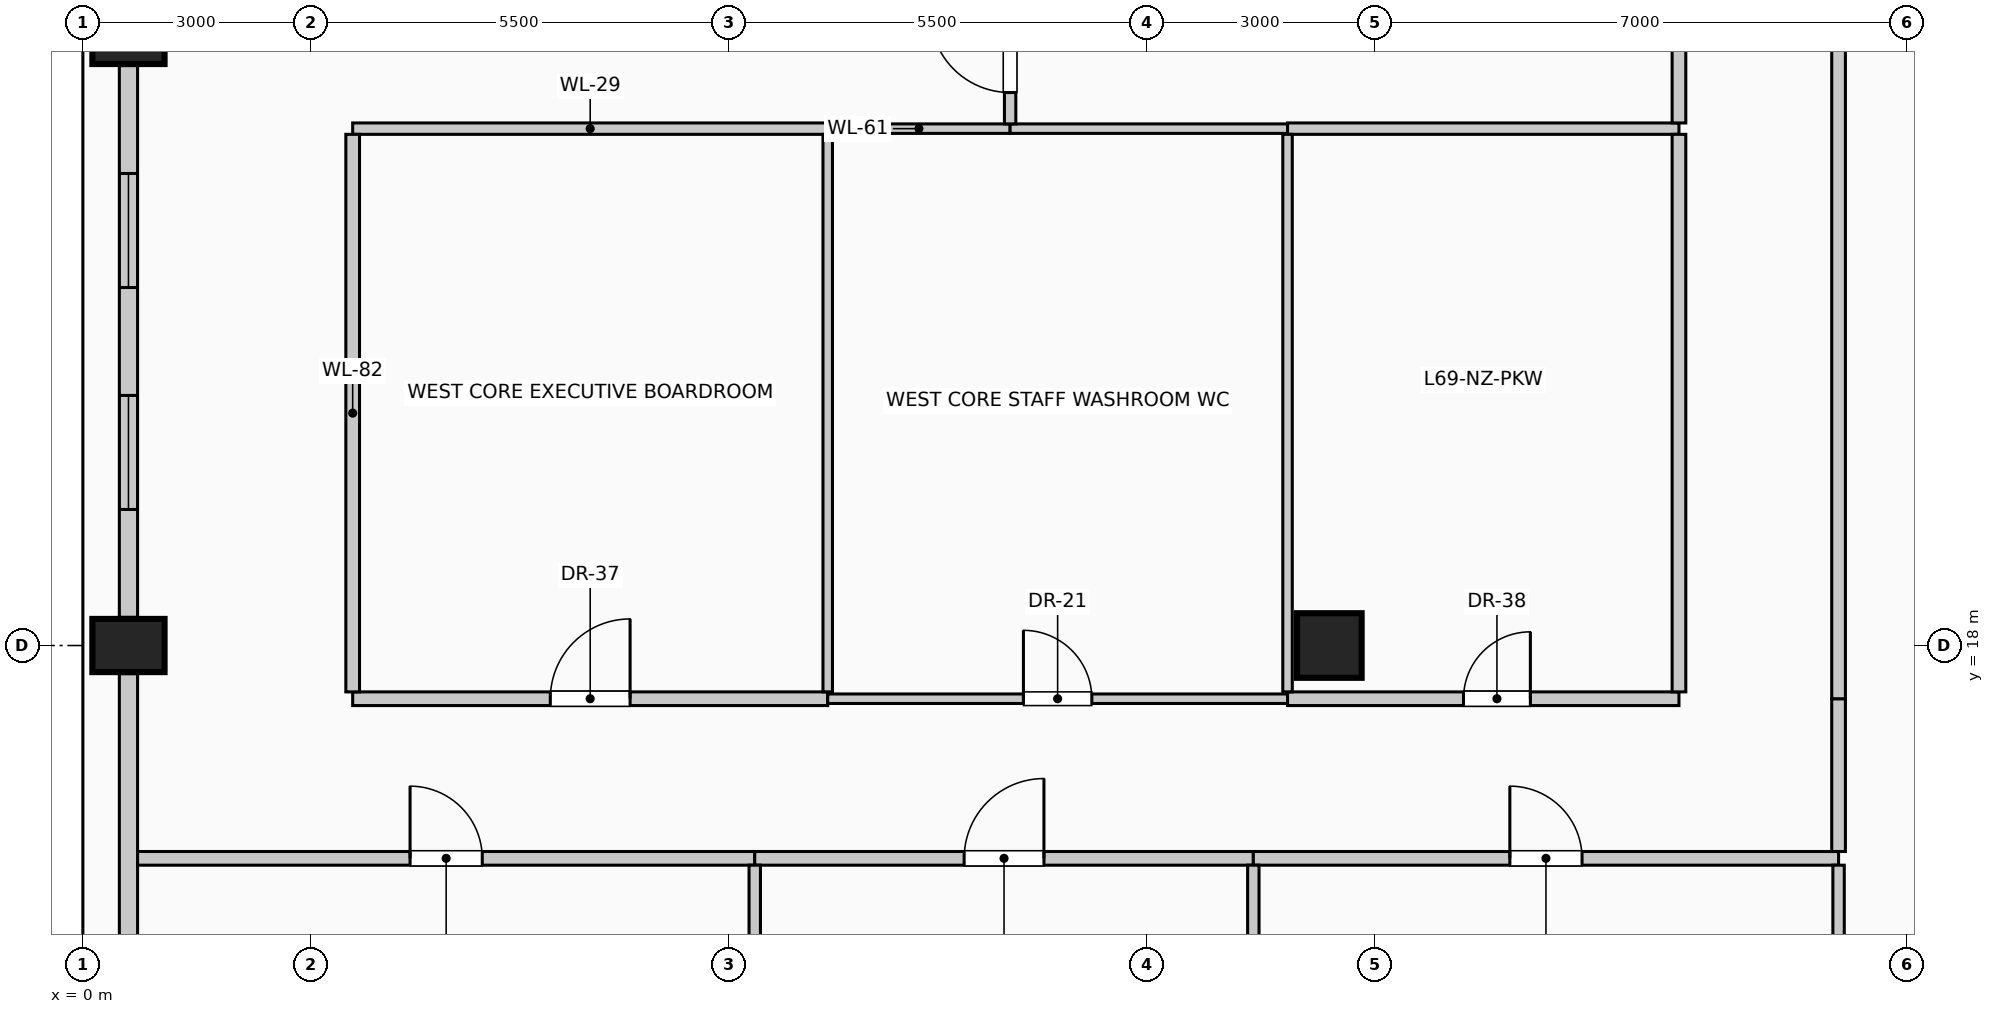
"""IFC4 building model, lengths in metres.
Left out: names, types, materials, properties, quantities, classifications, styles, units other than length and angle.
Written with IfcOpenShell. Run it as: python <this file> out.ifc"""

import sys

from ifc_helpers import new_model, si_unit, direction, frame, frame_2d, origin, origin_2d, place, context, subcontext, project, spatial, rectangle, circle, extrude, element, fill, save


model = new_model("IFC4")
c1 = context("Model", 3, precision=1e-05, world=origin(), true_north=direction((0.0, 1.0)))
c2 = subcontext(c1, "Body", "Model", "MODEL_VIEW")
j1 = project(units=[si_unit("LENGTHUNIT", "METRE"), si_unit("PLANEANGLEUNIT", "RADIAN")], contexts=[c1])
p1 = place(None, origin())
s1 = spatial("IfcSite", under=j1, at=p1, CompositionType="ELEMENT")
p2 = place(p1, origin())
s2 = spatial("IfcBuilding", under=s1, at=p2, CompositionType="ELEMENT")
p3 = place(p2, frame((0.0, 0.0, 285.0)))
s3 = spatial("IfcBuildingStorey", under=s2, at=p3, CompositionType="ELEMENT", Elevation=285.0)
for number, where, z_axis, x_axis in (
    (1, (0.6, 18.0, 0.0), (0.0, 0.0, 1.0), (0.0, 1.0, 0.0)),
    (2, (0.6, 26.0, 0.0), (0.0, 0.0, 1.0), (0.0, 1.0, 0.0)),
):
    element("IfcColumn", number, at=place(p3, frame(where, z_axis=z_axis, x_axis=x_axis)), inside=s3, PredefinedType="COLUMN", context=c2, shape_type="SweptSolid", body=[
        extrude(rectangle(XDim=0.7, YDim=0.95, at=origin_2d()), origin(), (0.0, 0.0, 1.0), 4.0),
    ])
p4 = place(p3, frame((16.4, 18.0, 0.0), z_axis=(0.0, 0.0, 1.0), x_axis=(1.0, 0.0, 0.0)))
e3 = element("IfcColumn", 3, at=p4, inside=s3, PredefinedType="COLUMN", context=c2, shape_type="SweptSolid", body=[
    extrude(circle(Radius=0.425, at=origin_2d()), origin(), (0.0, 0.0, 1.0), 4.0),
])
p5 = place(p3, frame((0.6, 10.37, 0.0), z_axis=(0.0, 0.0, 1.0), x_axis=(0.0, 1.0, 0.0)))
e4 = element("IfcWall", 4, at=p5, inside=s3, PredefinedType="SOLIDWALL", context=c2, shape_type="SweptSolid", body=[
    extrude(rectangle(XDim=7.26, YDim=0.24, at=frame_2d((3.63, 0.0))), origin(), (0.0, 0.0, 1.0), 3.025),
])
p6 = place(p5, frame((1.42, 0.0, 0.42)))
e5 = element("IfcOpeningElement", 5, at=p6, cuts=e4, PredefinedType="OPENING", context=c2, shape_type="SweptSolid", body=[
    extrude(rectangle(XDim=1.5, YDim=2.2, at=frame_2d((0.75, 1.1))), frame((0.0, 0.13, 0.0), z_axis=(0.0, -1.0, 0.0), x_axis=(1.0, 0.0, 0.0)), (0.0, 0.0, 1.0), 0.26),
])
p7 = place(p3, frame((0.6, 18.37, 0.0), z_axis=(0.0, 0.0, 1.0), x_axis=(0.0, 1.0, 0.0)))
e6 = element("IfcWall", 6, at=p7, inside=s3, PredefinedType="SOLIDWALL", context=c2, shape_type="SweptSolid", body=[
    extrude(rectangle(XDim=7.26, YDim=0.24, at=frame_2d((3.63, 0.0))), origin(), (0.0, 0.0, 1.0), 3.025),
])
p8 = place(p7, frame((1.42, 0.0, 0.42)))
e7 = element("IfcOpeningElement", 7, at=p8, cuts=e6, PredefinedType="OPENING", context=c2, shape_type="SweptSolid", body=[
    extrude(rectangle(XDim=1.5, YDim=2.2, at=frame_2d((0.75, 1.1))), frame((0.0, 0.13, 0.0), z_axis=(0.0, -1.0, 0.0), x_axis=(1.0, 0.0, 0.0)), (0.0, 0.0, 1.0), 0.26),
])
p9 = place(p7, frame((4.34, 0.0, 0.42)))
e8 = element("IfcOpeningElement", 8, at=p9, cuts=e6, PredefinedType="OPENING", context=c2, shape_type="SweptSolid", body=[
    extrude(rectangle(XDim=1.5, YDim=2.2, at=frame_2d((0.75, 1.1))), frame((0.0, 0.13, 0.0), z_axis=(0.0, -1.0, 0.0), x_axis=(1.0, 0.0, 0.0)), (0.0, 0.0, 1.0), 0.26),
])
p10 = place(p3, frame((0.72, 15.2, 0.0), z_axis=(0.0, 0.0, 1.0), x_axis=(1.0, 0.0, 0.0)))
e9 = element("IfcWall", 9, at=p10, inside=s3, PredefinedType="PARTITIONING", context=c2, shape_type="SweptSolid", body=[
    extrude(rectangle(XDim=8.12, YDim=0.18, at=frame_2d((4.06, 0.0))), origin(), (0.0, 0.0, 1.0), 3.775),
])
p11 = place(p10, frame((3.585, 0.0, 0.0)))
e10 = element("IfcOpeningElement", 10, at=p11, cuts=e9, PredefinedType="OPENING", context=c2, shape_type="SweptSolid", body=[
    extrude(rectangle(XDim=0.95, YDim=2.15, at=frame_2d((0.475, 1.075))), frame((0.0, 0.1, 0.0), z_axis=(0.0, -1.0, 0.0), x_axis=(1.0, 0.0, 0.0)), (0.0, 0.0, 1.0), 0.2),
])
p12 = place(p3, frame((8.84, 15.2, 0.0), z_axis=(0.0, 0.0, 1.0), x_axis=(1.0, 0.0, 0.0)))
e11 = element("IfcWall", 11, at=p12, inside=s3, PredefinedType="PARTITIONING", context=c2, shape_type="SweptSolid", body=[
    extrude(rectangle(XDim=6.56, YDim=0.18, at=frame_2d((3.28, 0.0))), origin(), (0.0, 0.0, 1.0), 3.775),
])
p13 = place(p12, frame((2.755, 0.0, 0.0)))
e12 = element("IfcOpeningElement", 12, at=p13, cuts=e11, PredefinedType="OPENING", context=c2, shape_type="SweptSolid", body=[
    extrude(rectangle(XDim=1.05, YDim=2.15, at=frame_2d((0.525, 1.075))), frame((0.0, 0.1, 0.0), z_axis=(0.0, -1.0, 0.0), x_axis=(1.0, 0.0, 0.0)), (0.0, 0.0, 1.0), 0.2),
])
p14 = place(p3, frame((15.4, 15.2, 0.0), z_axis=(0.0, 0.0, 1.0), x_axis=(1.0, 0.0, 0.0)))
e13 = element("IfcWall", 13, at=p14, inside=s3, PredefinedType="PARTITIONING", context=c2, shape_type="SweptSolid", body=[
    extrude(rectangle(XDim=7.7, YDim=0.18, at=frame_2d((3.85, 0.0))), origin(), (0.0, 0.0, 1.0), 3.775),
])
p15 = place(p14, frame((3.375, 0.0, 0.0)))
e14 = element("IfcOpeningElement", 14, at=p15, cuts=e13, PredefinedType="OPENING", context=c2, shape_type="SweptSolid", body=[
    extrude(rectangle(XDim=0.95, YDim=2.15, at=frame_2d((0.475, 1.075))), frame((0.0, 0.1, 0.0), z_axis=(0.0, -1.0, 0.0), x_axis=(1.0, 0.0, 0.0)), (0.0, 0.0, 1.0), 0.2),
])
p16 = place(p3, frame((3.55, 17.3, 0.0), z_axis=(0.0, 0.0, 1.0), x_axis=(1.0, 0.0, 0.0)))
e15 = element("IfcWall", 15, at=p16, inside=s3, PredefinedType="PARTITIONING", context=c2, shape_type="SweptSolid", body=[
    extrude(rectangle(XDim=6.25, YDim=0.18, at=frame_2d((3.125, 0.0))), origin(), (0.0, 0.0, 1.0), 3.775),
])
p17 = place(p16, frame((2.6, 0.0, 0.0)))
e16 = element("IfcOpeningElement", 16, at=p17, cuts=e15, PredefinedType="OPENING", context=c2, shape_type="SweptSolid", body=[
    extrude(rectangle(XDim=1.05, YDim=2.15, at=frame_2d((0.525, 1.075))), frame((0.0, 0.1, 0.0), z_axis=(0.0, -1.0, 0.0), x_axis=(1.0, 0.0, 0.0)), (0.0, 0.0, 1.0), 0.2),
])
p18 = place(p3, frame((9.8, 17.3, 0.0), z_axis=(0.0, 0.0, 1.0), x_axis=(1.0, 0.0, 0.0)))
e17 = element("IfcWall", 17, at=p18, inside=s3, PredefinedType="PARTITIONING", context=c2, shape_type="SweptSolid", body=[
    extrude(rectangle(XDim=6.05, YDim=0.125, at=frame_2d((3.025, 0.0))), origin(), (0.0, 0.0, 1.0), 3.775),
])
p19 = place(p18, frame((2.575, 0.0, 0.0)))
e18 = element("IfcOpeningElement", 18, at=p19, cuts=e17, PredefinedType="OPENING", context=c2, shape_type="SweptSolid", body=[
    extrude(rectangle(XDim=0.9, YDim=2.1, at=frame_2d((0.45, 1.05))), frame((0.0, 0.073, 0.0), z_axis=(0.0, -1.0, 0.0), x_axis=(1.0, 0.0, 0.0)), (0.0, 0.0, 1.0), 0.145),
])
p20 = place(p3, frame((15.85, 17.3, 0.0), z_axis=(0.0, 0.0, 1.0), x_axis=(1.0, 0.0, 0.0)))
e19 = element("IfcWall", 19, at=p20, inside=s3, PredefinedType="PARTITIONING", context=c2, shape_type="SweptSolid", body=[
    extrude(rectangle(XDim=5.15, YDim=0.18, at=frame_2d((2.575, 0.0))), origin(), (0.0, 0.0, 1.0), 3.775),
])
p21 = place(p20, frame((2.315, 0.0, 0.0)))
e20 = element("IfcOpeningElement", 20, at=p21, cuts=e19, PredefinedType="OPENING", context=c2, shape_type="SweptSolid", body=[
    extrude(rectangle(XDim=0.88, YDim=2.1, at=frame_2d((0.44, 1.05))), frame((0.0, 0.1, 0.0), z_axis=(0.0, -1.0, 0.0), x_axis=(1.0, 0.0, 0.0)), (0.0, 0.0, 1.0), 0.2),
])
p22 = place(p3, frame((3.55, 24.8, 0.0), z_axis=(0.0, 0.0, 1.0), x_axis=(1.0, 0.0, 0.0)))
e21 = element("IfcWall", 21, at=p22, inside=s3, PredefinedType="PARTITIONING", context=c2, shape_type="SweptSolid", body=[
    extrude(rectangle(XDim=6.25, YDim=0.15, at=frame_2d((3.125, 0.0))), origin(), (0.0, 0.0, 1.0), 3.775),
])
p23 = place(p3, frame((9.8, 24.8, 0.0), z_axis=(0.0, 0.0, 1.0), x_axis=(1.0, 0.0, 0.0)))
e22 = element("IfcWall", 22, at=p23, inside=s3, PredefinedType="PARTITIONING", context=c2, shape_type="SweptSolid", body=[
    extrude(rectangle(XDim=2.4, YDim=0.125, at=frame_2d((1.2, 0.0))), origin(), (0.0, 0.0, 1.0), 3.775),
])
p24 = place(p3, frame((12.2, 24.8, 0.0), z_axis=(0.0, 0.0, 1.0), x_axis=(1.0, 0.0, 0.0)))
e23 = element("IfcWall", 23, at=p24, inside=s3, PredefinedType="PARTITIONING", context=c2, shape_type="SweptSolid", body=[
    extrude(rectangle(XDim=3.65, YDim=0.125, at=frame_2d((1.825, 0.0))), origin(), (0.0, 0.0, 1.0), 3.775),
])
p25 = place(p3, frame((15.85, 24.8, 0.0), z_axis=(0.0, 0.0, 1.0), x_axis=(1.0, 0.0, 0.0)))
e24 = element("IfcWall", 24, at=p25, inside=s3, PredefinedType="PARTITIONING", context=c2, shape_type="SweptSolid", body=[
    extrude(rectangle(XDim=5.15, YDim=0.15, at=frame_2d((2.575, 0.0))), origin(), (0.0, 0.0, 1.0), 3.775),
])
p26 = place(p3, frame((3.55, 17.39, 0.0), z_axis=(0.0, 0.0, 1.0), x_axis=(0.0, 1.0, 0.0)))
e25 = element("IfcWall", 25, at=p26, inside=s3, PredefinedType="PARTITIONING", context=c2, shape_type="SweptSolid", body=[
    extrude(rectangle(XDim=7.335, YDim=0.18, at=frame_2d((3.667, 0.0))), origin(), (0.0, 0.0, 1.0), 3.775),
])
p27 = place(p3, frame((8.84, 1.075, 0.0), z_axis=(0.0, 0.0, 1.0), x_axis=(0.0, 1.0, 0.0)))
e26 = element("IfcWall", 26, at=p27, inside=s3, PredefinedType="PARTITIONING", context=c2, shape_type="SweptSolid", body=[
    extrude(rectangle(XDim=14.035, YDim=0.15, at=frame_2d((7.018, 0.0))), origin(), (0.0, 0.0, 1.0), 3.775),
])
p28 = place(p3, frame((9.8, 17.39, 0.0), z_axis=(0.0, 0.0, 1.0), x_axis=(0.0, 1.0, 0.0)))
e27 = element("IfcWall", 27, at=p28, inside=s3, PredefinedType="PARTITIONING", context=c2, shape_type="SweptSolid", body=[
    extrude(rectangle(XDim=7.335, YDim=0.125, at=frame_2d((3.667, 0.0))), origin(), (0.0, 0.0, 1.0), 3.775),
])
p29 = place(p3, frame((12.2, 24.863, 0.0), z_axis=(0.0, 0.0, 1.0), x_axis=(0.0, 1.0, 0.0)))
e28 = element("IfcWall", 28, at=p29, inside=s3, PredefinedType="PARTITIONING", context=c2, shape_type="SweptSolid", body=[
    extrude(rectangle(XDim=1.875, YDim=0.15, at=frame_2d((0.938, 0.0))), origin(), (0.0, 0.0, 1.0), 3.775),
])
p30 = place(p29, frame((0.413, 0.0, 0.0)))
e29 = element("IfcOpeningElement", 29, at=p30, cuts=e28, PredefinedType="OPENING", context=c2, shape_type="SweptSolid", body=[
    extrude(rectangle(XDim=1.05, YDim=2.15, at=frame_2d((0.525, 1.075))), frame((0.0, 0.085, 0.0), z_axis=(0.0, -1.0, 0.0), x_axis=(1.0, 0.0, 0.0)), (0.0, 0.0, 1.0), 0.17),
])
p31 = place(p3, frame((15.4, 0.72, 0.0), z_axis=(0.0, 0.0, 1.0), x_axis=(0.0, 1.0, 0.0)))
e30 = element("IfcWall", 30, at=p31, inside=s3, PredefinedType="PARTITIONING", context=c2, shape_type="SweptSolid", body=[
    extrude(rectangle(XDim=14.39, YDim=0.15, at=frame_2d((7.195, 0.0))), origin(), (0.0, 0.0, 1.0), 3.775),
])
p32 = place(p3, frame((15.85, 17.39, 0.0), z_axis=(0.0, 0.0, 1.0), x_axis=(0.0, 1.0, 0.0)))
e31 = element("IfcWall", 31, at=p32, inside=s3, PredefinedType="PARTITIONING", context=c2, shape_type="SweptSolid", body=[
    extrude(rectangle(XDim=7.335, YDim=0.125, at=frame_2d((3.667, 0.0))), origin(), (0.0, 0.0, 1.0), 3.775),
])
p33 = place(p3, frame((21.0, 17.39, 0.0), z_axis=(0.0, 0.0, 1.0), x_axis=(0.0, 1.0, 0.0)))
e32 = element("IfcWall", 32, at=p33, inside=s3, PredefinedType="PARTITIONING", context=c2, shape_type="SweptSolid", body=[
    extrude(rectangle(XDim=7.335, YDim=0.18, at=frame_2d((3.667, 0.0))), origin(), (0.0, 0.0, 1.0), 3.775),
])
p34 = place(p3, frame((21.0, 24.875, 0.0), z_axis=(0.0, 0.0, 1.0), x_axis=(0.0, 1.0, 0.0)))
e33 = element("IfcWall", 33, at=p34, inside=s3, PredefinedType="PARTITIONING", context=c2, shape_type="SweptSolid", body=[
    extrude(rectangle(XDim=2.35, YDim=0.18, at=frame_2d((1.175, 0.0))), origin(), (0.0, 0.0, 1.0), 3.775),
])
p35 = place(p3, frame((23.1, 0.6, 0.0), z_axis=(0.0, 0.0, 1.0), x_axis=(0.0, 1.0, 0.0)))
e34 = element("IfcWall", 34, at=p35, inside=s3, PredefinedType="PARTITIONING", context=c2, shape_type="SweptSolid", body=[
    extrude(rectangle(XDim=14.51, YDim=0.15, at=frame_2d((7.255, 0.0))), origin(), (0.0, 0.0, 1.0), 3.775),
])
p36 = place(p3, frame((23.1, 15.29, 0.0), z_axis=(0.0, 0.0, 1.0), x_axis=(0.0, 1.0, 0.0)))
e35 = element("IfcWall", 35, at=p36, inside=s3, PredefinedType="PARTITIONING", context=c2, shape_type="SweptSolid", body=[
    extrude(rectangle(XDim=2.01, YDim=0.18, at=frame_2d((1.005, 0.0))), origin(), (0.0, 0.0, 1.0), 3.775),
])
p37 = place(p3, frame((23.1, 17.3, 0.0), z_axis=(0.0, 0.0, 1.0), x_axis=(0.0, 1.0, 0.0)))
e36 = element("IfcWall", 36, at=p37, inside=s3, PredefinedType="PARTITIONING", context=c2, shape_type="SweptSolid", body=[
    extrude(rectangle(XDim=9.51, YDim=0.18, at=frame_2d((4.755, 0.0))), origin(), (0.0, 0.0, 1.0), 3.775),
])
p38 = place(p8, origin())
e37 = element("IfcWindow", 37, at=p38, inside=s3, PartitioningType="SINGLE_PANEL", PredefinedType="WINDOW", context=c2, shape_type="SweptSolid", body=[
    extrude(rectangle(XDim=1.5, YDim=2.2, at=frame_2d((0.75, 1.1))), frame((0.0, 0.03, 0.0), z_axis=(0.0, -1.0, 0.0), x_axis=(1.0, 0.0, 0.0)), (0.0, 0.0, 1.0), 0.06),
])
fill(e7, e37)
p39 = place(p9, origin())
e38 = element("IfcWindow", 38, at=p39, inside=s3, PartitioningType="SINGLE_PANEL", PredefinedType="WINDOW", context=c2, shape_type="SweptSolid", body=[
    extrude(rectangle(XDim=1.5, YDim=2.2, at=frame_2d((0.75, 1.1))), frame((0.0, 0.03, 0.0), z_axis=(0.0, -1.0, 0.0), x_axis=(1.0, 0.0, 0.0)), (0.0, 0.0, 1.0), 0.06),
])
fill(e8, e38)
p40 = place(p11, origin())
e39 = element("IfcDoor", 39, at=p40, inside=s3, OperationType="SINGLE_SWING_LEFT", PredefinedType="DOOR", context=c2, shape_type="SweptSolid", body=[
    extrude(rectangle(XDim=0.95, YDim=2.15, at=frame_2d((0.475, 1.075))), frame((0.0, 0.025, 0.0), z_axis=(0.0, -1.0, 0.0), x_axis=(1.0, 0.0, 0.0)), (0.0, 0.0, 1.0), 0.05),
])
fill(e10, e39)
p41 = place(p13, origin())
e40 = element("IfcDoor", 40, at=p41, inside=s3, OperationType="SINGLE_SWING_RIGHT", PredefinedType="DOOR", context=c2, shape_type="SweptSolid", body=[
    extrude(rectangle(XDim=1.05, YDim=2.15, at=frame_2d((0.525, 1.075))), frame((0.0, 0.025, 0.0), z_axis=(0.0, -1.0, 0.0), x_axis=(1.0, 0.0, 0.0)), (0.0, 0.0, 1.0), 0.05),
])
fill(e12, e40)
p42 = place(p15, origin())
e41 = element("IfcDoor", 41, at=p42, inside=s3, OperationType="SINGLE_SWING_LEFT", PredefinedType="DOOR", context=c2, shape_type="SweptSolid", body=[
    extrude(rectangle(XDim=0.95, YDim=2.15, at=frame_2d((0.475, 1.075))), frame((0.0, 0.025, 0.0), z_axis=(0.0, -1.0, 0.0), x_axis=(1.0, 0.0, 0.0)), (0.0, 0.0, 1.0), 0.05),
])
fill(e14, e41)
p43 = place(p17, origin())
e42 = element("IfcDoor", 42, at=p43, inside=s3, OperationType="SINGLE_SWING_RIGHT", PredefinedType="DOOR", context=c2, shape_type="SweptSolid", body=[
    extrude(rectangle(XDim=1.05, YDim=2.15, at=frame_2d((0.525, 1.075))), frame((0.0, 0.025, 0.0), z_axis=(0.0, -1.0, 0.0), x_axis=(1.0, 0.0, 0.0)), (0.0, 0.0, 1.0), 0.05),
])
fill(e16, e42)
p44 = place(p19, origin())
e43 = element("IfcDoor", 43, at=p44, inside=s3, OperationType="SINGLE_SWING_LEFT", PredefinedType="DOOR", context=c2, shape_type="SweptSolid", body=[
    extrude(rectangle(XDim=0.9, YDim=2.1, at=frame_2d((0.45, 1.05))), frame((0.0, 0.025, 0.0), z_axis=(0.0, -1.0, 0.0), x_axis=(1.0, 0.0, 0.0)), (0.0, 0.0, 1.0), 0.05),
])
fill(e18, e43)
p45 = place(p21, origin())
e44 = element("IfcDoor", 44, at=p45, inside=s3, OperationType="SINGLE_SWING_RIGHT", PredefinedType="DOOR", context=c2, shape_type="SweptSolid", body=[
    extrude(rectangle(XDim=0.88, YDim=2.1, at=frame_2d((0.44, 1.05))), frame((0.0, 0.025, 0.0), z_axis=(0.0, -1.0, 0.0), x_axis=(1.0, 0.0, 0.0)), (0.0, 0.0, 1.0), 0.05),
])
fill(e20, e44)
p46 = place(p30, origin())
e45 = element("IfcDoor", 45, at=p46, inside=s3, OperationType="SINGLE_SWING_RIGHT", PredefinedType="DOOR", context=c2, shape_type="SweptSolid", body=[
    extrude(rectangle(XDim=1.05, YDim=2.15, at=frame_2d((0.525, 1.075))), frame((0.0, 0.025, 0.0), z_axis=(0.0, -1.0, 0.0), x_axis=(1.0, 0.0, 0.0)), (0.0, 0.0, 1.0), 0.05),
])
fill(e29, e45)
save(model, sys.argv[1])
